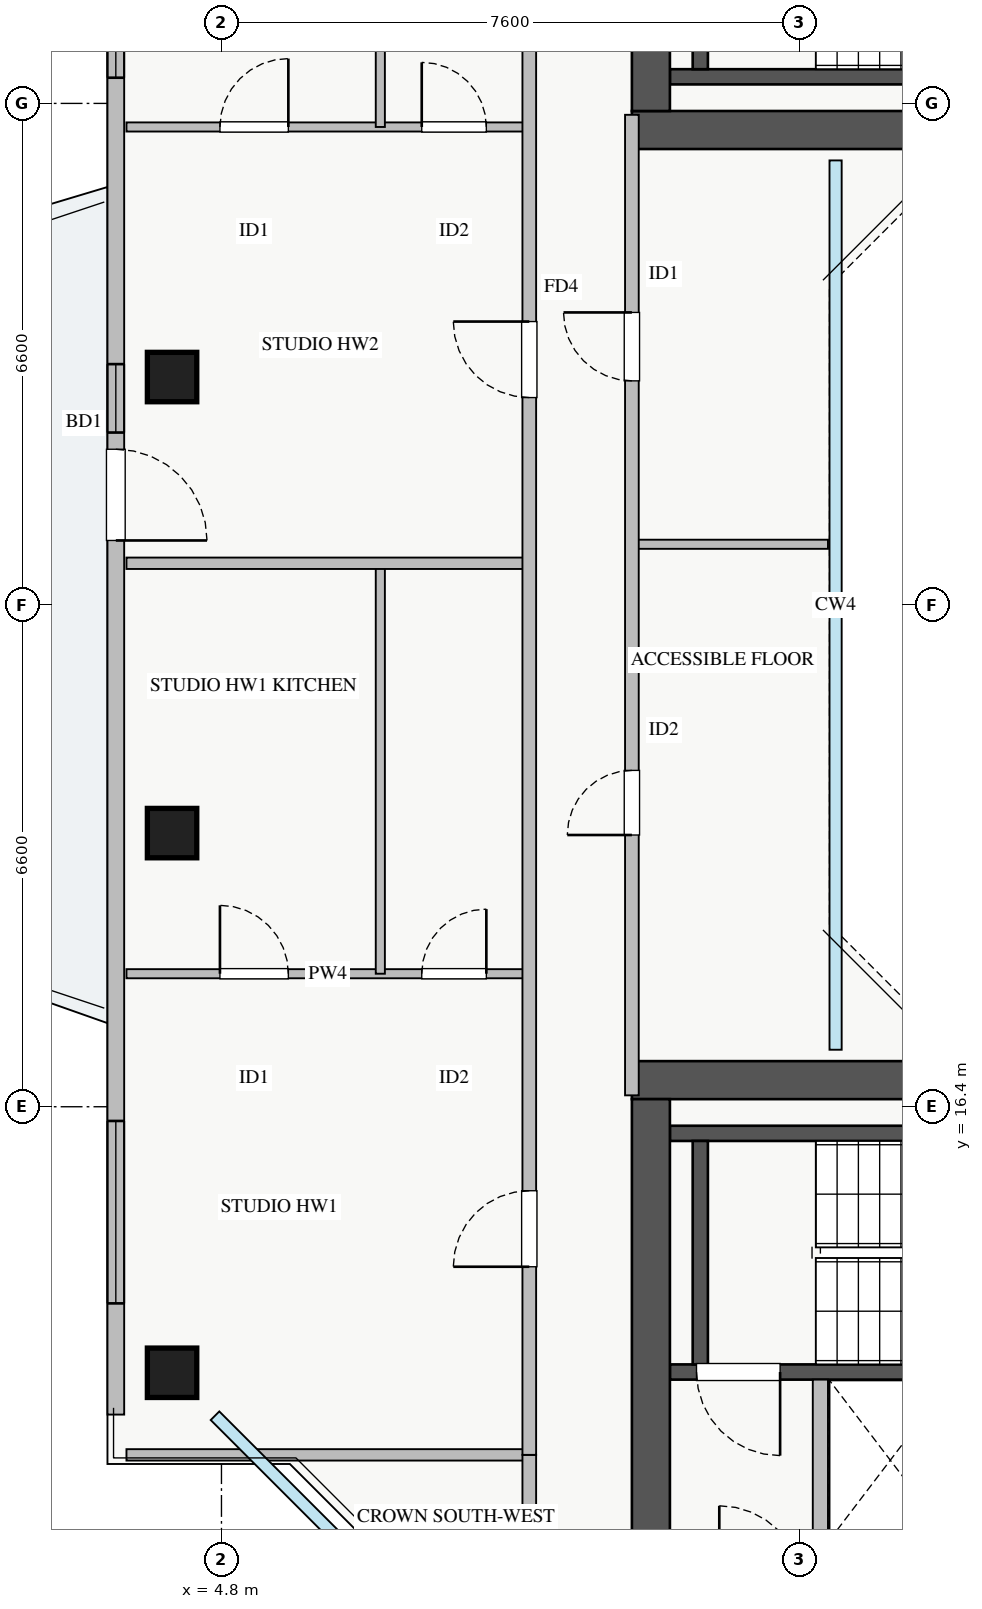
"""IFC4 building model, lengths in metres.
Left out: names, types, materials, properties, quantities, classifications, styles, units other than length and angle.
Written with IfcOpenShell. Run it as: python <this file> out.ifc"""

import sys

from ifc_helpers import new_model, si_unit, direction, frame, frame_2d, origin, origin_2d, place, context, subcontext, project, spatial, rectangle, extrude, source, transform, mapped, element, fill, save


model = new_model("IFC4")
c1 = context("Model", 3, precision=1e-05, world=origin(), true_north=direction((0.0, 1.0)))
c2 = subcontext(c1, "Body", "Model", "MODEL_VIEW")
j1 = project(units=[si_unit("LENGTHUNIT", "METRE"), si_unit("PLANEANGLEUNIT", "RADIAN")], contexts=[c1])
p1 = place(None, origin())
s1 = spatial("IfcSite", under=j1, at=p1, CompositionType="ELEMENT")
p2 = place(p1, origin())
s2 = spatial("IfcBuilding", under=s1, at=p2, CompositionType="ELEMENT")
p3 = place(p2, frame((0.0, 0.0, 253.5)))
s3 = spatial("IfcBuildingStorey", under=s2, at=p3, CompositionType="ELEMENT", Elevation=253.5)
p4 = place(p3, frame((12.68, 12.8, 0.0), z_axis=(0.0, 0.0, 1.0), x_axis=(1.0, 0.0, 0.0)))
e1 = element("IfcWall", 1, at=p4, inside=s3, PredefinedType="SHEAR", context=c2, shape_type="SweptSolid", body=[
    extrude(rectangle(XDim=1.94, YDim=0.18, at=frame_2d((0.97, 0.0))), origin(), (0.0, 0.0, 1.0), 3.07),
])
p5 = place(p3, frame((10.7, 29.95, 0.0), z_axis=(0.0, 0.0, 1.0), x_axis=(1.0, 0.0, 0.0)))
e2 = element("IfcWall", 2, at=p5, inside=s3, PredefinedType="SHEAR", context=c2, shape_type="SweptSolid", body=[
    extrude(rectangle(XDim=7.45, YDim=0.2, at=frame_2d((3.725, 0.0))), origin(), (0.0, 0.0, 1.0), 3.25),
])
p6 = place(p3, frame((11.1, 30.05, 0.0), z_axis=(0.0, 0.0, 1.0), x_axis=(0.0, 1.0, 0.0)))
e3 = element("IfcWall", 3, at=p6, inside=s3, PredefinedType="SHEAR", context=c2, shape_type="SweptSolid", body=[
    extrude(rectangle(XDim=2.94, YDim=0.2, at=frame_2d((1.47, 0.0))), origin(), (0.0, 0.0, 1.0), 3.25),
])
p7 = place(p3, frame((10.7, 12.91, 0.0), z_axis=(0.0, 0.0, 1.0), x_axis=(1.0, 0.0, 0.0)))
e4 = element("IfcWall", 4, at=p7, inside=s3, PredefinedType="SHEAR", context=c2, shape_type="SweptSolid", body=[
    extrude(rectangle(XDim=7.45, YDim=0.2, at=frame_2d((3.725, 0.0))), origin(), (0.0, 0.0, 1.0), 3.25),
])
p8 = place(p7, frame((0.35, 0.0, 0.0)))
e5 = element("IfcOpeningElement", 5, at=p8, cuts=e4, PredefinedType="OPENING", context=c2, shape_type="SweptSolid", body=[
    extrude(rectangle(XDim=1.1, YDim=2.05, at=frame_2d((0.55, 1.025))), frame((0.0, 0.11, 0.0), z_axis=(0.0, -1.0, 0.0), x_axis=(1.0, 0.0, 0.0)), (0.0, 0.0, 1.0), 0.22),
])
p9 = place(p3, frame((10.7, 16.05, 0.0), z_axis=(0.0, 0.0, 1.0), x_axis=(1.0, 0.0, 0.0)))
e6 = element("IfcWall", 6, at=p9, inside=s3, PredefinedType="SHEAR", context=c2, shape_type="SweptSolid", body=[
    extrude(rectangle(XDim=7.45, YDim=0.2, at=frame_2d((3.725, 0.0))), origin(), (0.0, 0.0, 1.0), 3.25),
])
p10 = place(p3, frame((11.1, 13.01, 0.0), z_axis=(0.0, 0.0, 1.0), x_axis=(0.0, 1.0, 0.0)))
e7 = element("IfcWall", 7, at=p10, inside=s3, PredefinedType="SHEAR", context=c2, shape_type="SweptSolid", body=[
    extrude(rectangle(XDim=2.94, YDim=0.2, at=frame_2d((1.47, 0.0))), origin(), (0.0, 0.0, 1.0), 3.25),
])
p11 = place(p3, frame((10.2, 29.25, 0.0), z_axis=(0.0, 0.0, 1.0), x_axis=(1.0, 0.0, 0.0)))
e8 = element("IfcWall", 8, at=p11, inside=s3, PredefinedType="SHEAR", context=c2, shape_type="SweptSolid", body=[
    extrude(rectangle(XDim=17.6, YDim=0.5, at=frame_2d((8.8, 0.0))), origin(), (0.0, 0.0, 1.0), 3.25),
])
p12 = place(p3, frame((10.45, 29.5, 0.0), z_axis=(0.0, 0.0, 1.0), x_axis=(0.0, 1.0, 0.0)))
e9 = element("IfcWall", 9, at=p12, inside=s3, PredefinedType="SHEAR", context=c2, shape_type="SweptSolid", body=[
    extrude(rectangle(XDim=6.2, YDim=0.5, at=frame_2d((3.1, 0.0))), origin(), (0.0, 0.0, 1.0), 3.25),
])
p13 = place(p3, frame((10.2, 16.75, 0.0), z_axis=(0.0, 0.0, 1.0), x_axis=(1.0, 0.0, 0.0)))
e10 = element("IfcWall", 10, at=p13, inside=s3, PredefinedType="SHEAR", context=c2, shape_type="SweptSolid", body=[
    extrude(rectangle(XDim=17.6, YDim=0.5, at=frame_2d((8.8, 0.0))), origin(), (0.0, 0.0, 1.0), 3.25),
])
p14 = place(p3, frame((10.45, 10.3, 0.0), z_axis=(0.0, 0.0, 1.0), x_axis=(0.0, 1.0, 0.0)))
e11 = element("IfcWall", 11, at=p14, inside=s3, PredefinedType="SHEAR", context=c2, shape_type="SweptSolid", body=[
    extrude(rectangle(XDim=6.2, YDim=0.5, at=frame_2d((3.1, 0.0))), origin(), (0.0, 0.0, 1.0), 3.25),
])
m1 = source(origin(), c2, "Body", "SweptSolid", [
    extrude(rectangle(XDim=0.65, YDim=0.65, at=origin_2d()), origin(), (0.0, 0.0, 1.0), 3.25),
])
for number, where, z_axis, x_axis in (
    (12, (4.15, 26.0, 0.0), (0.0, 0.0, 1.0), (1.0, 0.0, 0.0)),
    (13, (4.15, 20.0, 0.0), (0.0, 0.0, 1.0), (1.0, 0.0, 0.0)),
    (14, (4.15, 12.9, 0.0), (0.0, 0.0, 1.0), (1.0, 0.0, 0.0)),
):
    element("IfcColumn", number, at=place(p3, frame(where, z_axis=z_axis, x_axis=x_axis)), inside=s3, PredefinedType="COLUMN", context=c2, shape_type="MappedRepresentation", body=[
        mapped(m1, transform((0.0, 0.0, 0.0), x_axis=(1.0, 0.0, 0.0), y_axis=(0.0, 1.0, 0.0), z_axis=(0.0, 0.0, 1.0), scale=1.0)),
    ])
p15 = place(p3, frame((3.41, 12.35, 0.0), z_axis=(0.0, 0.0, 1.0), x_axis=(0.0, 1.0, 0.0)))
e15 = element("IfcWall", 15, at=p15, inside=s3, PredefinedType="STANDARD", context=c2, shape_type="SweptSolid", body=[
    extrude(rectangle(XDim=21.3, YDim=0.22, at=frame_2d((10.65, 0.0))), origin(), (0.0, 0.0, 1.0), 2.61),
])
p16 = place(p15, frame((11.5, 0.0, 0.0)))
e16 = element("IfcOpeningElement", 16, at=p16, cuts=e15, PredefinedType="OPENING", context=c2, shape_type="SweptSolid", body=[
    extrude(rectangle(XDim=1.2, YDim=2.1, at=frame_2d((0.6, 1.05))), frame((0.0, 0.12, 0.0), z_axis=(0.0, -1.0, 0.0), x_axis=(1.0, 0.0, 0.0)), (0.0, 0.0, 1.0), 0.24),
])
p17 = place(p15, frame((1.463, 0.0, 0.9)))
e17 = element("IfcOpeningElement", 17, at=p17, cuts=e15, PredefinedType="OPENING", context=c2, shape_type="SweptSolid", body=[
    extrude(rectangle(XDim=2.4, YDim=1.48, at=frame_2d((1.2, 0.74))), frame((0.0, 0.12, 0.0), z_axis=(0.0, -1.0, 0.0), x_axis=(1.0, 0.0, 0.0)), (0.0, 0.0, 1.0), 0.24),
])
p18 = place(p15, frame((17.588, 0.0, 0.9)))
e18 = element("IfcOpeningElement", 18, at=p18, cuts=e15, PredefinedType="OPENING", context=c2, shape_type="SweptSolid", body=[
    extrude(rectangle(XDim=2.1, YDim=1.48, at=frame_2d((1.05, 0.74))), frame((0.0, 0.12, 0.0), z_axis=(0.0, -1.0, 0.0), x_axis=(1.0, 0.0, 0.0)), (0.0, 0.0, 1.0), 0.24),
])
p19 = place(p15, frame((12.92, 0.0, 0.9)))
e19 = element("IfcOpeningElement", 19, at=p19, cuts=e15, PredefinedType="OPENING", context=c2, shape_type="SweptSolid", body=[
    extrude(rectangle(XDim=0.9, YDim=1.2, at=frame_2d((0.45, 0.6))), frame((0.0, 0.12, 0.0), z_axis=(0.0, -1.0, 0.0), x_axis=(1.0, 0.0, 0.0)), (0.0, 0.0, 1.0), 0.24),
])
p20 = place(p3, frame((12.68, 10.6, 0.0), z_axis=(0.0, 0.0, 1.0), x_axis=(0.0, 1.0, 0.0)))
e20 = element("IfcWall", 20, at=p20, inside=s3, PredefinedType="PARTITIONING", context=c2, shape_type="SweptSolid", body=[
    extrude(rectangle(XDim=2.21, YDim=0.2, at=frame_2d((1.105, 0.0))), origin(), (0.0, 0.0, 1.0), 3.07),
])
p21 = place(p3, frame((3.55, 11.82, 0.0), z_axis=(0.0, 0.0, 1.0), x_axis=(1.0, 0.0, 0.0)))
e21 = element("IfcWall", 21, at=p21, inside=s3, PredefinedType="PARTITIONING", context=c2, shape_type="SweptSolid", body=[
    extrude(rectangle(XDim=5.3, YDim=0.15, at=frame_2d((2.65, 0.0))), origin(), (0.0, 0.0, 1.0), 3.07),
])
p22 = place(p3, frame((8.85, 8.56, 0.0), z_axis=(0.0, 0.0, 1.0), x_axis=(0.0, 1.0, 0.0)))
e22 = element("IfcWall", 22, at=p22, inside=s3, PredefinedType="PARTITIONING", context=c2, shape_type="SweptSolid", body=[
    extrude(rectangle(XDim=3.26, YDim=0.18, at=frame_2d((1.63, 0.0))), origin(), (0.0, 0.0, 1.0), 2.569),
])
p23 = place(p3, frame((3.55, 18.15, 0.0), z_axis=(0.0, 0.0, 1.0), x_axis=(1.0, 0.0, 0.0)))
e23 = element("IfcWall", 23, at=p23, inside=s3, PredefinedType="PLUMBINGWALL", context=c2, shape_type="SweptSolid", body=[
    extrude(rectangle(XDim=5.3, YDim=0.12, at=frame_2d((2.65, 0.0))), origin(), (0.0, 0.0, 1.0), 2.865),
])
p24 = place(p23, frame((1.23, 0.0, 0.0)))
e24 = element("IfcOpeningElement", 24, at=p24, cuts=e23, PredefinedType="OPENING", context=c2, shape_type="SweptSolid", body=[
    extrude(rectangle(XDim=0.9, YDim=2.05, at=frame_2d((0.45, 1.025))), frame((0.0, 0.07, 0.0), z_axis=(0.0, -1.0, 0.0), x_axis=(1.0, 0.0, 0.0)), (0.0, 0.0, 1.0), 0.14),
])
p25 = place(p23, frame((3.885, 0.0, 0.0)))
e25 = element("IfcOpeningElement", 25, at=p25, cuts=e23, PredefinedType="OPENING", context=c2, shape_type="SweptSolid", body=[
    extrude(rectangle(XDim=0.85, YDim=2.05, at=frame_2d((0.425, 1.025))), frame((0.0, 0.07, 0.0), z_axis=(0.0, -1.0, 0.0), x_axis=(1.0, 0.0, 0.0)), (0.0, 0.0, 1.0), 0.14),
])
p26 = place(p3, frame((6.89, 18.15, 0.0), z_axis=(0.0, 0.0, 1.0), x_axis=(0.0, 1.0, 0.0)))
e26 = element("IfcWall", 26, at=p26, inside=s3, PredefinedType="PLUMBINGWALL", context=c2, shape_type="SweptSolid", body=[
    extrude(rectangle(XDim=5.4, YDim=0.12, at=frame_2d((2.7, 0.0))), origin(), (0.0, 0.0, 1.0), 3.07),
])
p27 = place(p3, frame((3.55, 29.29, 0.0), z_axis=(0.0, 0.0, 1.0), x_axis=(1.0, 0.0, 0.0)))
e27 = element("IfcWall", 27, at=p27, inside=s3, PredefinedType="PLUMBINGWALL", context=c2, shape_type="SweptSolid", body=[
    extrude(rectangle(XDim=5.3, YDim=0.12, at=frame_2d((2.65, 0.0))), origin(), (0.0, 0.0, 1.0), 3.07),
])
p28 = place(p27, frame((1.23, 0.0, 0.0)))
e28 = element("IfcOpeningElement", 28, at=p28, cuts=e27, PredefinedType="OPENING", context=c2, shape_type="SweptSolid", body=[
    extrude(rectangle(XDim=0.9, YDim=2.05, at=frame_2d((0.45, 1.025))), frame((0.0, 0.07, 0.0), z_axis=(0.0, -1.0, 0.0), x_axis=(1.0, 0.0, 0.0)), (0.0, 0.0, 1.0), 0.14),
])
p29 = place(p27, frame((3.885, 0.0, 0.0)))
e29 = element("IfcOpeningElement", 29, at=p29, cuts=e27, PredefinedType="OPENING", context=c2, shape_type="SweptSolid", body=[
    extrude(rectangle(XDim=0.85, YDim=2.05, at=frame_2d((0.425, 1.025))), frame((0.0, 0.07, 0.0), z_axis=(0.0, -1.0, 0.0), x_axis=(1.0, 0.0, 0.0)), (0.0, 0.0, 1.0), 0.14),
])
p30 = place(p3, frame((6.89, 29.29, 0.0), z_axis=(0.0, 0.0, 1.0), x_axis=(0.0, 1.0, 0.0)))
e30 = element("IfcWall", 30, at=p30, inside=s3, PredefinedType="PLUMBINGWALL", context=c2, shape_type="SweptSolid", body=[
    extrude(rectangle(XDim=4.89, YDim=0.12, at=frame_2d((2.445, 0.0))), origin(), (0.0, 0.0, 1.0), 3.07),
])
p31 = place(p3, frame((3.55, 23.55, 0.0), z_axis=(0.0, 0.0, 1.0), x_axis=(1.0, 0.0, 0.0)))
e31 = element("IfcWall", 31, at=p31, inside=s3, PredefinedType="PARTITIONING", context=c2, shape_type="SweptSolid", body=[
    extrude(rectangle(XDim=5.3, YDim=0.15, at=frame_2d((2.65, 0.0))), origin(), (0.0, 0.0, 1.0), 3.07),
])
p32 = place(p3, frame((8.85, 11.82, 0.0), z_axis=(0.0, 0.0, 1.0), x_axis=(0.0, 1.0, 0.0)))
e32 = element("IfcWall", 32, at=p32, inside=s3, PredefinedType="PARTITIONING", context=c2, shape_type="SweptSolid", body=[
    extrude(rectangle(XDim=22.36, YDim=0.18, at=frame_2d((11.18, 0.0))), origin(), (0.0, 0.0, 1.0), 2.569),
])
p33 = place(p32, frame((2.475, 0.0, 0.0)))
e33 = element("IfcOpeningElement", 33, at=p33, cuts=e32, PredefinedType="OPENING", context=c2, shape_type="SweptSolid", body=[
    extrude(rectangle(XDim=1.0, YDim=2.05, at=frame_2d((0.5, 1.025))), frame((0.0, 0.1, 0.0), z_axis=(0.0, -1.0, 0.0), x_axis=(1.0, 0.0, 0.0)), (0.0, 0.0, 1.0), 0.2),
])
p34 = place(p32, frame((13.91, 0.0, 0.0)))
e34 = element("IfcOpeningElement", 34, at=p34, cuts=e32, PredefinedType="OPENING", context=c2, shape_type="SweptSolid", body=[
    extrude(rectangle(XDim=1.0, YDim=2.05, at=frame_2d((0.5, 1.025))), frame((0.0, 0.1, 0.0), z_axis=(0.0, -1.0, 0.0), x_axis=(1.0, 0.0, 0.0)), (0.0, 0.0, 1.0), 0.2),
])
p35 = place(p3, frame((10.2, 23.8, 0.0), z_axis=(0.0, 0.0, 1.0), x_axis=(1.0, 0.0, 0.0)))
e35 = element("IfcWall", 35, at=p35, inside=s3, PredefinedType="PLUMBINGWALL", context=c2, shape_type="SweptSolid", body=[
    extrude(rectangle(XDim=2.58, YDim=0.12, at=frame_2d((1.29, 0.0))), origin(), (0.0, 0.0, 1.0), 3.07),
])
p36 = place(p3, frame((10.2, 16.55, 0.0), z_axis=(0.0, 0.0, 1.0), x_axis=(0.0, 1.0, 0.0)))
e36 = element("IfcWall", 36, at=p36, inside=s3, PredefinedType="PARTITIONING", context=c2, shape_type="SweptSolid", body=[
    extrude(rectangle(XDim=12.9, YDim=0.18, at=frame_2d((6.45, 0.0))), origin(), (0.0, 0.0, 1.0), 3.07),
])
p37 = place(p36, frame((3.425, 0.0, 0.0)))
e37 = element("IfcOpeningElement", 37, at=p37, cuts=e36, PredefinedType="OPENING", context=c2, shape_type="SweptSolid", body=[
    extrude(rectangle(XDim=0.85, YDim=2.05, at=frame_2d((0.425, 1.025))), frame((0.0, 0.1, 0.0), z_axis=(0.0, -1.0, 0.0), x_axis=(1.0, 0.0, 0.0)), (0.0, 0.0, 1.0), 0.2),
])
p38 = place(p36, frame((9.4, 0.0, 0.0)))
e38 = element("IfcOpeningElement", 38, at=p38, cuts=e36, PredefinedType="OPENING", context=c2, shape_type="SweptSolid", body=[
    extrude(rectangle(XDim=0.9, YDim=2.05, at=frame_2d((0.45, 1.025))), frame((0.0, 0.1, 0.0), z_axis=(0.0, -1.0, 0.0), x_axis=(1.0, 0.0, 0.0)), (0.0, 0.0, 1.0), 0.2),
])
m2 = source(origin(), c2, "Body", "SweptSolid", [
    extrude(rectangle(XDim=1.2, YDim=2.1, at=frame_2d((0.6, 1.05))), frame((0.0, 0.025, 0.0), z_axis=(0.0, -1.0, 0.0), x_axis=(1.0, 0.0, 0.0)), (0.0, 0.0, 1.0), 0.05),
])
p39 = place(p16, frame((1.2, 0.0, 0.0), z_axis=(0.0, 0.0, 1.0), x_axis=(-1.0, 0.0, 0.0)))
e39 = element("IfcDoor", 39, at=p39, inside=s3, OperationType="SINGLE_SWING_LEFT", PredefinedType="DOOR", context=c2, shape_type="MappedRepresentation", body=[
    mapped(m2, transform((0.0, 0.0, 0.0), x_axis=(1.0, 0.0, 0.0), y_axis=(0.0, 1.0, 0.0), z_axis=(0.0, 0.0, 1.0), scale=1.0)),
])
fill(e16, e39)
m3 = source(origin(), c2, "Body", "SweptSolid", [
    extrude(rectangle(XDim=2.4, YDim=1.48, at=frame_2d((1.2, 0.74))), frame((0.0, 0.03, 0.0), z_axis=(0.0, -1.0, 0.0), x_axis=(1.0, 0.0, 0.0)), (0.0, 0.0, 1.0), 0.06),
])
p40 = place(p17, origin())
e40 = element("IfcWindow", 40, at=p40, inside=s3, PartitioningType="TRIPLE_PANEL_VERTICAL", PredefinedType="WINDOW", context=c2, shape_type="MappedRepresentation", body=[
    mapped(m3, transform((0.0, 0.0, 0.0), x_axis=(1.0, 0.0, 0.0), y_axis=(0.0, 1.0, 0.0), z_axis=(0.0, 0.0, 1.0), scale=1.0)),
])
fill(e17, e40)
m4 = source(origin(), c2, "Body", "SweptSolid", [
    extrude(rectangle(XDim=2.1, YDim=1.48, at=frame_2d((1.05, 0.74))), frame((0.0, 0.03, 0.0), z_axis=(0.0, -1.0, 0.0), x_axis=(1.0, 0.0, 0.0)), (0.0, 0.0, 1.0), 0.06),
])
p41 = place(p18, origin())
e41 = element("IfcWindow", 41, at=p41, inside=s3, PartitioningType="TRIPLE_PANEL_VERTICAL", PredefinedType="WINDOW", context=c2, shape_type="MappedRepresentation", body=[
    mapped(m4, transform((0.0, 0.0, 0.0), x_axis=(1.0, 0.0, 0.0), y_axis=(0.0, 1.0, 0.0), z_axis=(0.0, 0.0, 1.0), scale=1.0)),
])
fill(e18, e41)
m5 = source(origin(), c2, "Body", "SweptSolid", [
    extrude(rectangle(XDim=1.1, YDim=2.05, at=frame_2d((0.55, 1.025))), frame((0.0, 0.025, 0.0), z_axis=(0.0, -1.0, 0.0), x_axis=(1.0, 0.0, 0.0)), (0.0, 0.0, 1.0), 0.05),
])
p42 = place(p8, frame((1.1, 0.0, 0.0), z_axis=(0.0, 0.0, 1.0), x_axis=(-1.0, 0.0, 0.0)))
e42 = element("IfcDoor", 42, at=p42, inside=s3, OperationType="SINGLE_SWING_RIGHT", PredefinedType="DOOR", context=c2, shape_type="MappedRepresentation", body=[
    mapped(m5, transform((0.0, 0.0, 0.0), x_axis=(1.0, 0.0, 0.0), y_axis=(0.0, 1.0, 0.0), z_axis=(0.0, 0.0, 1.0), scale=1.0)),
])
fill(e5, e42)
m6 = source(origin(), c2, "Body", "SweptSolid", [
    extrude(rectangle(XDim=0.9, YDim=2.05, at=frame_2d((0.45, 1.025))), frame((0.0, 0.025, 0.0), z_axis=(0.0, -1.0, 0.0), x_axis=(1.0, 0.0, 0.0)), (0.0, 0.0, 1.0), 0.05),
])
p43 = place(p24, origin())
e43 = element("IfcDoor", 43, at=p43, inside=s3, OperationType="SINGLE_SWING_LEFT", PredefinedType="DOOR", context=c2, shape_type="MappedRepresentation", body=[
    mapped(m6, transform((0.0, 0.0, 0.0), x_axis=(1.0, 0.0, 0.0), y_axis=(0.0, 1.0, 0.0), z_axis=(0.0, 0.0, 1.0), scale=1.0)),
])
fill(e24, e43)
m7 = source(origin(), c2, "Body", "SweptSolid", [
    extrude(rectangle(XDim=0.85, YDim=2.05, at=frame_2d((0.425, 1.025))), frame((0.0, 0.025, 0.0), z_axis=(0.0, -1.0, 0.0), x_axis=(1.0, 0.0, 0.0)), (0.0, 0.0, 1.0), 0.05),
])
p44 = place(p25, origin())
e44 = element("IfcDoor", 44, at=p44, inside=s3, OperationType="SINGLE_SWING_RIGHT", PredefinedType="DOOR", context=c2, shape_type="MappedRepresentation", body=[
    mapped(m7, transform((0.0, 0.0, 0.0), x_axis=(1.0, 0.0, 0.0), y_axis=(0.0, 1.0, 0.0), z_axis=(0.0, 0.0, 1.0), scale=1.0)),
])
fill(e25, e44)
p45 = place(p28, origin())
e45 = element("IfcDoor", 45, at=p45, inside=s3, OperationType="SINGLE_SWING_RIGHT", PredefinedType="DOOR", context=c2, shape_type="MappedRepresentation", body=[
    mapped(m6, transform((0.0, 0.0, 0.0), x_axis=(1.0, 0.0, 0.0), y_axis=(0.0, 1.0, 0.0), z_axis=(0.0, 0.0, 1.0), scale=1.0)),
])
fill(e28, e45)
p46 = place(p29, origin())
e46 = element("IfcDoor", 46, at=p46, inside=s3, OperationType="SINGLE_SWING_LEFT", PredefinedType="DOOR", context=c2, shape_type="MappedRepresentation", body=[
    mapped(m7, transform((0.0, 0.0, 0.0), x_axis=(1.0, 0.0, 0.0), y_axis=(0.0, 1.0, 0.0), z_axis=(0.0, 0.0, 1.0), scale=1.0)),
])
fill(e29, e46)
m8 = source(origin(), c2, "Body", "SweptSolid", [
    extrude(rectangle(XDim=1.0, YDim=2.05, at=frame_2d((0.5, 1.025))), frame((0.0, 0.025, 0.0), z_axis=(0.0, -1.0, 0.0), x_axis=(1.0, 0.0, 0.0)), (0.0, 0.0, 1.0), 0.05),
])
p47 = place(p33, origin())
e47 = element("IfcDoor", 47, at=p47, inside=s3, OperationType="SINGLE_SWING_LEFT", PredefinedType="DOOR", context=c2, shape_type="MappedRepresentation", body=[
    mapped(m8, transform((0.0, 0.0, 0.0), x_axis=(1.0, 0.0, 0.0), y_axis=(0.0, 1.0, 0.0), z_axis=(0.0, 0.0, 1.0), scale=1.0)),
])
fill(e33, e47)
p48 = place(p34, origin())
e48 = element("IfcDoor", 48, at=p48, inside=s3, OperationType="SINGLE_SWING_RIGHT", PredefinedType="DOOR", context=c2, shape_type="MappedRepresentation", body=[
    mapped(m8, transform((0.0, 0.0, 0.0), x_axis=(1.0, 0.0, 0.0), y_axis=(0.0, 1.0, 0.0), z_axis=(0.0, 0.0, 1.0), scale=1.0)),
])
fill(e34, e48)
p49 = place(p37, origin())
e49 = element("IfcDoor", 49, at=p49, inside=s3, OperationType="SINGLE_SWING_LEFT", PredefinedType="DOOR", context=c2, shape_type="MappedRepresentation", body=[
    mapped(m7, transform((0.0, 0.0, 0.0), x_axis=(1.0, 0.0, 0.0), y_axis=(0.0, 1.0, 0.0), z_axis=(0.0, 0.0, 1.0), scale=1.0)),
])
fill(e37, e49)
p50 = place(p38, origin())
e50 = element("IfcDoor", 50, at=p50, inside=s3, OperationType="SINGLE_SWING_RIGHT", PredefinedType="DOOR", context=c2, shape_type="MappedRepresentation", body=[
    mapped(m6, transform((0.0, 0.0, 0.0), x_axis=(1.0, 0.0, 0.0), y_axis=(0.0, 1.0, 0.0), z_axis=(0.0, 0.0, 1.0), scale=1.0)),
])
fill(e38, e50)
m9 = source(origin(), c2, "Body", "SweptSolid", [
    extrude(rectangle(XDim=0.9, YDim=1.2, at=frame_2d((0.45, 0.6))), frame((0.0, 0.03, 0.0), z_axis=(0.0, -1.0, 0.0), x_axis=(1.0, 0.0, 0.0)), (0.0, 0.0, 1.0), 0.06),
])
p51 = place(p19, origin())
e51 = element("IfcWindow", 51, at=p51, inside=s3, PartitioningType="SINGLE_PANEL", PredefinedType="WINDOW", context=c2, shape_type="MappedRepresentation", body=[
    mapped(m9, transform((0.0, 0.0, 0.0), x_axis=(1.0, 0.0, 0.0), y_axis=(0.0, 1.0, 0.0), z_axis=(0.0, 0.0, 1.0), scale=1.0)),
])
fill(e19, e51)
save(model, sys.argv[1])
